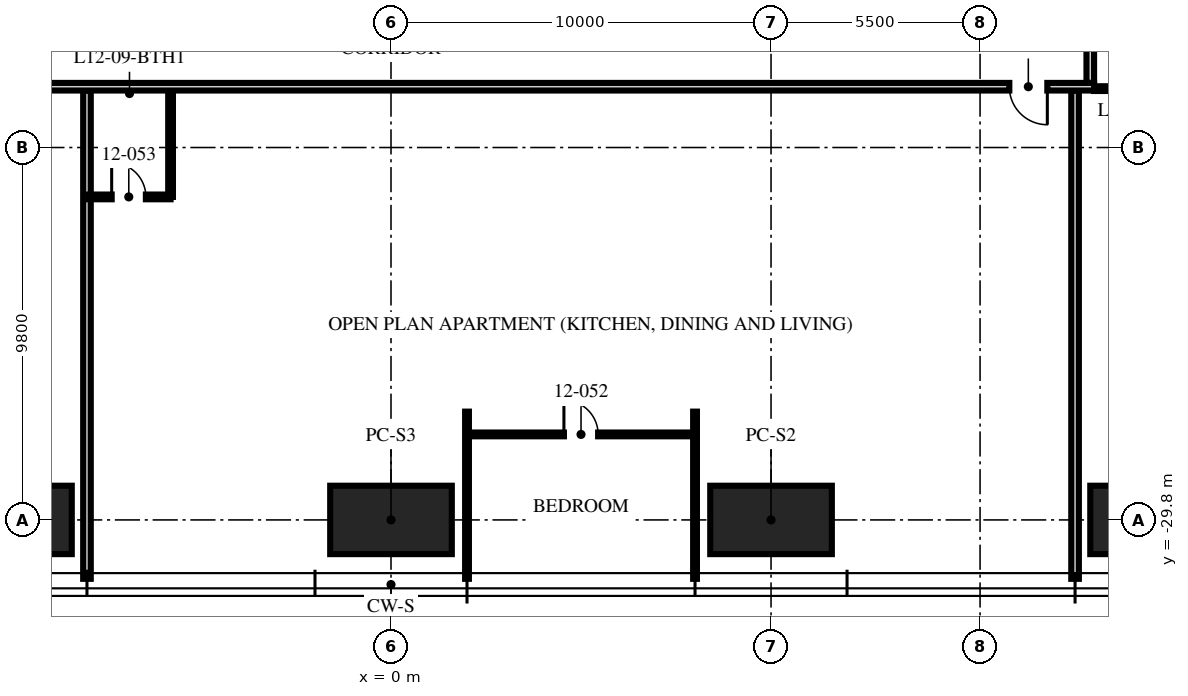
"""IFC4 building model, lengths in metres.
Left out: names, types, materials, properties, quantities, classifications, styles, units other than length and angle.
Written with IfcOpenShell. Run it as: python <this file> out.ifc"""

import sys

from ifc_helpers import new_model, si_unit, direction, frame, frame_2d, origin, origin_2d, place, context, subcontext, project, spatial, rectangle, hollow_rectangle, extrude, element, fill, save


model = new_model("IFC4")
c1 = context("Model", 3, precision=1e-05, world=origin(), true_north=direction((0.0, 1.0)))
c2 = subcontext(c1, "Body", "Model", "MODEL_VIEW")
j1 = project(units=[si_unit("LENGTHUNIT", "METRE"), si_unit("PLANEANGLEUNIT", "RADIAN")], contexts=[c1])
p1 = place(None, origin())
s1 = spatial("IfcSite", under=j1, at=p1, CompositionType="ELEMENT")
p2 = place(p1, origin())
s2 = spatial("IfcBuilding", under=s1, at=p2, CompositionType="ELEMENT")
p3 = place(p2, frame((0.0, 0.0, 51.0)))
s3 = spatial("IfcBuildingStorey", under=s2, at=p3, CompositionType="ELEMENT", Elevation=51.0)
for number, where, z_axis, x_axis in (
    (1, (20.0, -29.8, 0.0), (0.0, 0.0, 1.0), (1.0, 0.0, 0.0)),
    (2, (10.0, -29.8, 0.0), (0.0, 0.0, 1.0), (1.0, 0.0, 0.0)),
    (3, (0.0, -29.8, 0.0), (0.0, 0.0, 1.0), (1.0, 0.0, 0.0)),
    (4, (-10.0, -29.8, 0.0), (0.0, 0.0, 1.0), (1.0, 0.0, 0.0)),
):
    element("IfcColumn", number, at=place(p3, frame(where, z_axis=z_axis, x_axis=x_axis)), inside=s3, PredefinedType="COLUMN", context=c2, shape_type="SweptSolid", body=[
        extrude(hollow_rectangle(XDim=3.2, YDim=1.8, WallThickness=0.2, at=origin_2d()), origin(), (0.0, 0.0, 1.0), 3.75),
    ])
p4 = place(p3, frame((-8.0, -18.5, 0.0), z_axis=(0.0, 0.0, 1.0), x_axis=(0.0, -1.0, 0.0)))
e5 = element("IfcWall", 5, at=p4, inside=s3, PredefinedType="PARTITIONING", context=c2, shape_type="SweptSolid", body=[
    extrude(rectangle(XDim=12.85, YDim=0.2, at=frame_2d((6.425, 0.0))), origin(), (0.0, 0.0, 1.0), 2.71),
])
for number, where, z_axis, x_axis in (
    (6, (2.0, -26.95, 0.0), (0.0, 0.0, 1.0), (0.0, -1.0, 0.0)),
    (7, (8.0, -26.95, 0.0), (0.0, 0.0, 1.0), (0.0, -1.0, 0.0)),
):
    element("IfcWall", number, at=place(p3, frame(where, z_axis=z_axis, x_axis=x_axis)), inside=s3, PredefinedType="PARTITIONING", context=c2, shape_type="SweptSolid", body=[
        extrude(rectangle(XDim=4.4, YDim=0.1, at=frame_2d((2.2, 0.0))), origin(), (0.0, 0.0, 1.0), 2.71),
    ])
p5 = place(p3, frame((18.0, -18.5, 0.0), z_axis=(0.0, 0.0, 1.0), x_axis=(0.0, -1.0, 0.0)))
e8 = element("IfcWall", 8, at=p5, inside=s3, PredefinedType="PARTITIONING", context=c2, shape_type="SweptSolid", body=[
    extrude(rectangle(XDim=12.85, YDim=0.2, at=frame_2d((6.425, 0.0))), origin(), (0.0, 0.0, 1.0), 2.3),
])
p6 = place(p3, frame((2.0, -27.55, 0.0), z_axis=(0.0, 0.0, 1.0), x_axis=(1.0, 0.0, 0.0)))
e9 = element("IfcWall", 9, at=p6, inside=s3, PredefinedType="PARTITIONING", context=c2, shape_type="SweptSolid", body=[
    extrude(rectangle(XDim=6.0, YDim=0.1, at=frame_2d((3.0, 0.0))), origin(), (0.0, 0.0, 1.0), 2.61),
])
p7 = place(p6, frame((2.55, 0.0, 0.0)))
e10 = element("IfcOpeningElement", 10, at=p7, cuts=e9, PredefinedType="OPENING", context=c2, shape_type="SweptSolid", body=[
    extrude(rectangle(XDim=0.9, YDim=2.1, at=frame_2d((0.45, 1.05))), frame((0.0, 0.06, 0.0), z_axis=(0.0, -1.0, 0.0), x_axis=(1.0, 0.0, 0.0)), (0.0, 0.0, 1.0), 0.12),
])
p8 = place(p3, frame((-8.0, -21.3, 0.0), z_axis=(0.0, 0.0, 1.0), x_axis=(1.0, 0.0, 0.0)))
e11 = element("IfcWall", 11, at=p8, inside=s3, PredefinedType="PARTITIONING", context=c2, shape_type="SweptSolid", body=[
    extrude(rectangle(XDim=2.2, YDim=0.125, at=frame_2d((1.1, 0.0))), origin(), (0.0, 0.0, 1.0), 3.5),
])
p9 = place(p8, frame((0.65, 0.0, 0.0)))
e12 = element("IfcOpeningElement", 12, at=p9, cuts=e11, PredefinedType="OPENING", context=c2, shape_type="SweptSolid", body=[
    extrude(rectangle(XDim=0.9, YDim=2.1, at=frame_2d((0.45, 1.05))), frame((0.0, 0.073, 0.0), z_axis=(0.0, -1.0, 0.0), x_axis=(1.0, 0.0, 0.0)), (0.0, 0.0, 1.0), 0.145),
])
p10 = place(p3, frame((-5.8, -18.5, 0.0), z_axis=(0.0, 0.0, 1.0), x_axis=(0.0, -1.0, 0.0)))
e13 = element("IfcWall", 13, at=p10, inside=s3, PredefinedType="PARTITIONING", context=c2, shape_type="SweptSolid", body=[
    extrude(rectangle(XDim=2.8, YDim=0.125, at=frame_2d((1.4, 0.0))), origin(), (0.0, 0.0, 1.0), 3.5),
])
p11 = place(p3, frame((18.5, -18.45, 0.0), z_axis=(0.0, 0.0, 1.0), x_axis=(1.0, 0.0, 0.0)))
e14 = element("IfcWall", 14, at=p11, inside=s3, PredefinedType="PARTITIONING", context=c2, shape_type="SweptSolid", body=[
    extrude(rectangle(XDim=2.8, YDim=0.125, at=frame_2d((1.4, 0.0))), origin(), (0.0, 0.0, 1.0), 2.3),
])
p12 = place(p3, frame((18.4, -18.3, 0.0), z_axis=(0.0, 0.0, 1.0), x_axis=(0.0, 1.0, 0.0)))
e15 = element("IfcWall", 15, at=p12, inside=s3, PredefinedType="PARTITIONING", context=c2, shape_type="SweptSolid", body=[
    extrude(rectangle(XDim=4.3, YDim=0.2, at=frame_2d((2.15, 0.0))), origin(), (0.0, 0.0, 1.0), 2.3),
])
p13 = place(p3, frame((18.5, -18.4, 0.0), z_axis=(0.0, 0.0, 1.0), x_axis=(-1.0, 0.0, 0.0)))
e16 = element("IfcWall", 16, at=p13, inside=s3, PredefinedType="PARTITIONING", context=c2, shape_type="SweptSolid", body=[
    extrude(rectangle(XDim=37.0, YDim=0.2, at=frame_2d((18.5, 0.0))), origin(), (0.0, 0.0, 1.0), 2.3),
])
p14 = place(p13, frame((1.23, 0.0, 0.0)))
e17 = element("IfcOpeningElement", 17, at=p14, cuts=e16, PredefinedType="OPENING", context=c2, shape_type="SweptSolid", body=[
    extrude(rectangle(XDim=1.0, YDim=2.2, at=frame_2d((0.5, 1.1))), frame((0.0, 0.11, 0.0), z_axis=(0.0, -1.0, 0.0), x_axis=(1.0, 0.0, 0.0)), (0.0, 0.0, 1.0), 0.22),
])
p15 = place(p7, origin())
e18 = element("IfcDoor", 18, at=p15, inside=s3, OperationType="SINGLE_SWING_LEFT", PredefinedType="DOOR", context=c2, shape_type="SweptSolid", body=[
    extrude(rectangle(XDim=0.9, YDim=2.1, at=frame_2d((0.45, 1.05))), frame((0.0, 0.025, 0.0), z_axis=(0.0, -1.0, 0.0), x_axis=(1.0, 0.0, 0.0)), (0.0, 0.0, 1.0), 0.05),
])
fill(e10, e18)
p16 = place(p9, origin())
e19 = element("IfcDoor", 19, at=p16, inside=s3, OperationType="SINGLE_SWING_LEFT", PredefinedType="DOOR", context=c2, shape_type="SweptSolid", body=[
    extrude(rectangle(XDim=0.9, YDim=2.1, at=frame_2d((0.45, 1.05))), frame((0.0, 0.025, 0.0), z_axis=(0.0, -1.0, 0.0), x_axis=(1.0, 0.0, 0.0)), (0.0, 0.0, 1.0), 0.05),
])
fill(e12, e19)
p17 = place(p14, origin())
e20 = element("IfcDoor", 20, at=p17, inside=s3, OperationType="SINGLE_SWING_LEFT", PredefinedType="DOOR", context=c2, shape_type="SweptSolid", body=[
    extrude(rectangle(XDim=1.0, YDim=2.2, at=frame_2d((0.5, 1.1))), frame((0.0, 0.025, 0.0), z_axis=(0.0, -1.0, 0.0), x_axis=(1.0, 0.0, 0.0)), (0.0, 0.0, 1.0), 0.05),
])
fill(e17, e20)
save(model, sys.argv[1])
